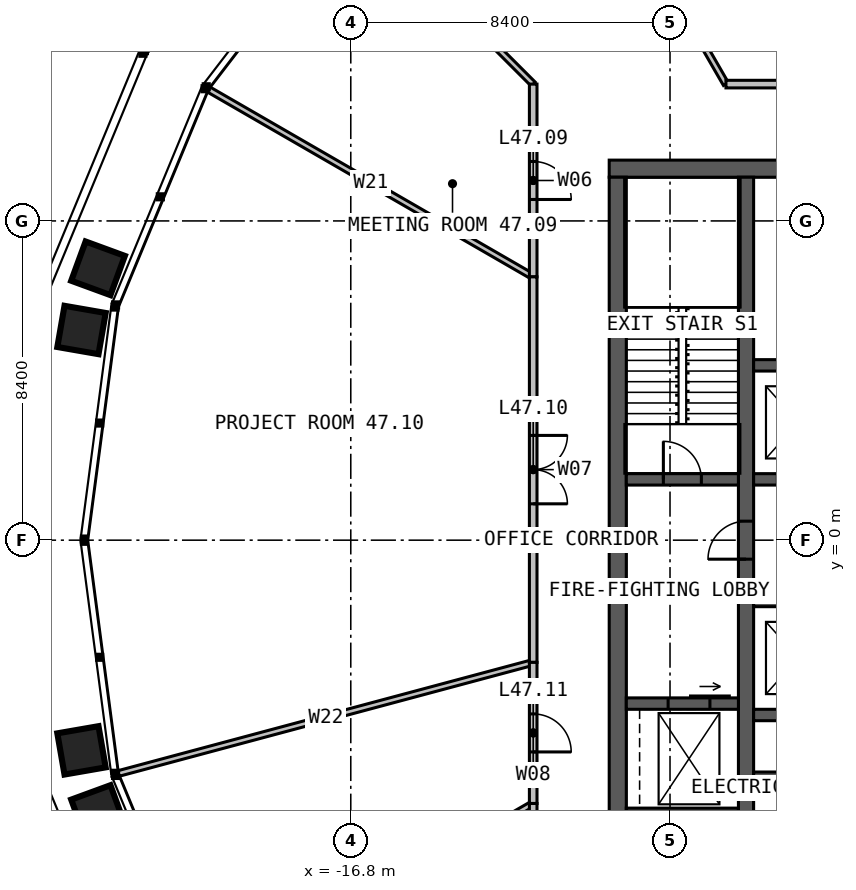
"""IFC4 building model, lengths in metres.
Left out: names, types, materials, properties, quantities, classifications, styles, units other than length and angle.
Written with IfcOpenShell. Run it as: python <this file> out.ifc"""

import sys

from ifc_helpers import new_model, si_unit, direction, frame, frame_2d, origin, place, context, subcontext, project, spatial, rectangle, extrude, element, fill, save


model = new_model("IFC4")
c1 = context("Model", 3, precision=1e-05, world=origin(), true_north=direction((0.0, 1.0)))
c2 = subcontext(c1, "Body", "Model", "MODEL_VIEW")
j1 = project(units=[si_unit("LENGTHUNIT", "METRE"), si_unit("PLANEANGLEUNIT", "RADIAN")], contexts=[c1])
p1 = place(None, origin())
s1 = spatial("IfcSite", under=j1, at=p1, CompositionType="ELEMENT")
p2 = place(p1, origin())
s2 = spatial("IfcBuilding", under=s1, at=p2, CompositionType="ELEMENT")
p3 = place(p2, frame((0.0, 0.0, 195.0)))
s3 = spatial("IfcBuildingStorey", under=s2, at=p3, CompositionType="ELEMENT", Elevation=195.0)
p4 = place(p3, frame((-10.0, 9.775, 0.0), z_axis=(0.0, 0.0, 1.0), x_axis=(1.0, 0.0, 0.0)))
e1 = element("IfcWall", 1, at=p4, inside=s3, PredefinedType="SOLIDWALL", context=c2, shape_type="SweptSolid", body=[
    extrude(rectangle(XDim=20.0, YDim=0.45, at=frame_2d((10.0, 0.0))), origin(), (0.0, 0.0, 1.0), 4.0),
])
p5 = place(p4, frame((9.4, 0.0, 0.0)))
e2 = element("IfcOpeningElement", 2, at=p5, cuts=e1, PredefinedType="OPENING", context=c2, shape_type="SweptSolid", body=[
    extrude(rectangle(XDim=1.2, YDim=2.2, at=frame_2d((0.6, 1.1))), frame((0.0, 0.235, 0.0), z_axis=(0.0, -1.0, 0.0), x_axis=(1.0, 0.0, 0.0)), (0.0, 0.0, 1.0), 0.47),
])
p6 = place(p3, frame((-9.775, 9.55, 0.0), z_axis=(0.0, 0.0, 1.0), x_axis=(0.0, -1.0, 0.0)))
e3 = element("IfcWall", 3, at=p6, inside=s3, PredefinedType="SOLIDWALL", context=c2, shape_type="SweptSolid", body=[
    extrude(rectangle(XDim=19.1, YDim=0.45, at=frame_2d((9.55, 0.0))), origin(), (0.0, 0.0, 1.0), 4.0),
])
p7 = place(p3, frame((-6.4, -9.55, 0.0), z_axis=(0.0, 0.0, 1.0), x_axis=(0.0, 1.0, 0.0)))
e4 = element("IfcWall", 4, at=p7, inside=s3, PredefinedType="SOLIDWALL", context=c2, shape_type="SweptSolid", body=[
    extrude(rectangle(XDim=19.1, YDim=0.4, at=frame_2d((9.55, 0.0))), origin(), (0.0, 0.0, 1.0), 4.0),
])
p8 = place(p7, frame((9.05, 0.0, 0.0)))
e5 = element("IfcOpeningElement", 5, at=p8, cuts=e4, PredefinedType="OPENING", context=c2, shape_type="SweptSolid", body=[
    extrude(rectangle(XDim=1.0, YDim=2.2, at=frame_2d((0.5, 1.1))), frame((0.0, 0.21, 0.0), z_axis=(0.0, -1.0, 0.0), x_axis=(1.0, 0.0, 0.0)), (0.0, 0.0, 1.0), 0.42),
])
p9 = place(p3, frame((-6.2, 1.6, 0.0), z_axis=(0.0, 0.0, 1.0), x_axis=(1.0, 0.0, 0.0)))
e6 = element("IfcWall", 6, at=p9, inside=s3, PredefinedType="SOLIDWALL", context=c2, shape_type="SweptSolid", body=[
    extrude(rectangle(XDim=4.85, YDim=0.3, at=frame_2d((2.425, 0.0))), origin(), (0.0, 0.0, 1.0), 4.0),
])
p10 = place(p9, frame((0.625, 0.0, 0.0)))
e7 = element("IfcOpeningElement", 7, at=p10, cuts=e6, PredefinedType="OPENING", context=c2, shape_type="SweptSolid", body=[
    extrude(rectangle(XDim=1.1, YDim=2.2, at=frame_2d((0.55, 1.1))), frame((0.0, 0.16, 0.0), z_axis=(0.0, -1.0, 0.0), x_axis=(1.0, 0.0, 0.0)), (0.0, 0.0, 1.0), 0.32),
])
p11 = place(p9, frame((3.15, 0.0, 0.0)))
e8 = element("IfcOpeningElement", 8, at=p11, cuts=e6, PredefinedType="OPENING", context=c2, shape_type="SweptSolid", body=[
    extrude(rectangle(XDim=1.1, YDim=2.2, at=frame_2d((0.55, 1.1))), frame((0.0, 0.16, 0.0), z_axis=(0.0, -1.0, 0.0), x_axis=(1.0, 0.0, 0.0)), (0.0, 0.0, 1.0), 0.32),
])
p12 = place(p3, frame((-6.2, 4.6, 0.0), z_axis=(0.0, 0.0, 1.0), x_axis=(1.0, 0.0, 0.0)))
e9 = element("IfcWall", 9, at=p12, inside=s3, PredefinedType="SOLIDWALL", context=c2, shape_type="SweptSolid", body=[
    extrude(rectangle(XDim=4.85, YDim=0.3, at=frame_2d((2.425, 0.0))), origin(), (0.0, 0.0, 1.0), 4.0),
])
for number, where, z_axis, x_axis in (
    (10, (-6.2, -1.6, 0.0), (0.0, 0.0, 1.0), (1.0, 0.0, 0.0)),
    (11, (-6.2, -4.6, 0.0), (0.0, 0.0, 1.0), (1.0, 0.0, 0.0)),
):
    element("IfcWall", number, at=place(p3, frame(where, z_axis=z_axis, x_axis=x_axis)), inside=s3, PredefinedType="SOLIDWALL", context=c2, shape_type="SweptSolid", body=[
        extrude(rectangle(XDim=7.4, YDim=0.3, at=frame_2d((3.7, 0.0))), origin(), (0.0, 0.0, 1.0), 4.0),
    ])
p13 = place(p3, frame((-6.2, -6.2, 0.0), z_axis=(0.0, 0.0, 1.0), x_axis=(1.0, 0.0, 0.0)))
e12 = element("IfcWall", 12, at=p13, inside=s3, PredefinedType="SOLIDWALL", context=c2, shape_type="SweptSolid", body=[
    extrude(rectangle(XDim=7.4, YDim=0.2, at=frame_2d((3.7, 0.0))), origin(), (0.0, 0.0, 1.0), 4.0),
])
p14 = place(p3, frame((-9.55, 1.6, 0.0), z_axis=(0.0, 0.0, 1.0), x_axis=(1.0, 0.0, 0.0)))
e13 = element("IfcWall", 13, at=p14, inside=s3, PredefinedType="SOLIDWALL", context=c2, shape_type="SweptSolid", body=[
    extrude(rectangle(XDim=2.95, YDim=0.3, at=frame_2d((1.475, 0.0))), origin(), (0.0, 0.0, 1.0), 4.0),
])
p15 = place(p14, frame((0.975, 0.0, 0.0)))
e14 = element("IfcOpeningElement", 14, at=p15, cuts=e13, PredefinedType="OPENING", context=c2, shape_type="SweptSolid", body=[
    extrude(rectangle(XDim=1.0, YDim=2.2, at=frame_2d((0.5, 1.1))), frame((0.0, 0.16, 0.0), z_axis=(0.0, -1.0, 0.0), x_axis=(1.0, 0.0, 0.0)), (0.0, 0.0, 1.0), 0.32),
])
p16 = place(p3, frame((-9.55, -4.3, 0.0), z_axis=(0.0, 0.0, 1.0), x_axis=(1.0, 0.0, 0.0)))
e15 = element("IfcWall", 15, at=p16, inside=s3, PredefinedType="SOLIDWALL", context=c2, shape_type="SweptSolid", body=[
    extrude(rectangle(XDim=2.95, YDim=0.3, at=frame_2d((1.475, 0.0))), origin(), (0.0, 0.0, 1.0), 4.0),
])
p17 = place(p16, frame((1.1, 0.0, 0.0)))
e16 = element("IfcOpeningElement", 16, at=p17, cuts=e15, PredefinedType="OPENING", context=c2, shape_type="SweptSolid", body=[
    extrude(rectangle(XDim=1.1, YDim=2.2, at=frame_2d((0.55, 1.1))), frame((0.0, 0.16, 0.0), z_axis=(0.0, -1.0, 0.0), x_axis=(1.0, 0.0, 0.0)), (0.0, 0.0, 1.0), 0.32),
])
p18 = place(p3, frame((-9.55, -7.2, 0.0), z_axis=(0.0, 0.0, 1.0), x_axis=(1.0, 0.0, 0.0)))
e17 = element("IfcWall", 17, at=p18, inside=s3, PredefinedType="SOLIDWALL", context=c2, shape_type="SweptSolid", body=[
    extrude(rectangle(XDim=2.95, YDim=0.3, at=frame_2d((1.475, 0.0))), origin(), (0.0, 0.0, 1.0), 4.0),
])
p19 = place(p3, frame((-6.928, 12.0, 0.0), z_axis=(0.0, 0.0, 1.0), x_axis=(-0.49999595416, 0.866027739639, 0.0)))
e18 = element("IfcWall", 18, at=p19, inside=s3, PredefinedType="PARTITIONING", context=c2, shape_type="SweptSolid", body=[
    extrude(rectangle(XDim=9.865, YDim=0.15, at=frame_2d((4.932, 0.0))), origin(), (0.0, 0.0, 1.0), 2.79),
])
p20 = place(p3, frame((-12.0, 12.0, 0.0), z_axis=(0.0, 0.0, 1.0), x_axis=(-0.707106781187, 0.707106781187, 0.0)))
e19 = element("IfcWall", 19, at=p20, inside=s3, PredefinedType="PARTITIONING", context=c2, shape_type="SweptSolid", body=[
    extrude(rectangle(XDim=6.751, YDim=0.15, at=frame_2d((3.375, 0.0))), origin(), (0.0, 0.0, 1.0), 2.79),
])
p21 = place(p3, frame((-12.0, 6.928, 0.0), z_axis=(0.0, 0.0, 1.0), x_axis=(-0.866027739639, 0.49999595416, 0.0)))
e20 = element("IfcWall", 20, at=p21, inside=s3, PredefinedType="PARTITIONING", context=c2, shape_type="SweptSolid", body=[
    extrude(rectangle(XDim=9.865, YDim=0.15, at=frame_2d((4.932, 0.0))), origin(), (0.0, 0.0, 1.0), 2.79),
])
p22 = place(p3, frame((-12.0, -3.215, 0.0), z_axis=(0.0, 0.0, 1.0), x_axis=(-0.965926155577, -0.258817816178, 0.0)))
e21 = element("IfcWall", 21, at=p22, inside=s3, PredefinedType="PARTITIONING", context=c2, shape_type="SweptSolid", body=[
    extrude(rectangle(XDim=11.298, YDim=0.15, at=frame_2d((5.649, 0.0))), origin(), (0.0, 0.0, 1.0), 2.79),
])
p23 = place(p3, frame((-12.0, -6.928, 0.0), z_axis=(0.0, 0.0, 1.0), x_axis=(-0.866027739639, -0.49999595416, 0.0)))
e22 = element("IfcWall", 22, at=p23, inside=s3, PredefinedType="PARTITIONING", context=c2, shape_type="SweptSolid", body=[
    extrude(rectangle(XDim=9.865, YDim=0.15, at=frame_2d((4.932, 0.0))), origin(), (0.0, 0.0, 1.0), 2.79),
])
p24 = place(p3, frame((6.928, 12.0, 0.0), z_axis=(0.0, 0.0, 1.0), x_axis=(-1.0, 0.0, 0.0)))
e23 = element("IfcWall", 23, at=p24, inside=s3, PredefinedType="PARTITIONING", context=c2, shape_type="SweptSolid", body=[
    extrude(rectangle(XDim=13.856, YDim=0.2, at=frame_2d((6.928, 0.0))), origin(), (0.0, 0.0, 1.0), 3.8),
])
p25 = place(p24, frame((6.028, 0.0, 0.0)))
e24 = element("IfcOpeningElement", 24, at=p25, cuts=e23, PredefinedType="OPENING", context=c2, shape_type="SweptSolid", body=[
    extrude(rectangle(XDim=1.8, YDim=2.2, at=frame_2d((0.9, 1.1))), frame((0.0, 0.11, 0.0), z_axis=(0.0, -1.0, 0.0), x_axis=(1.0, 0.0, 0.0)), (0.0, 0.0, 1.0), 0.22),
])
p26 = place(p3, frame((-12.0, 12.0, 0.0), z_axis=(0.0, 0.0, 1.0), x_axis=(0.0, -1.0, 0.0)))
e25 = element("IfcWall", 25, at=p26, inside=s3, PredefinedType="PARTITIONING", context=c2, shape_type="SweptSolid", body=[
    extrude(rectangle(XDim=5.072, YDim=0.2, at=frame_2d((2.536, 0.0))), origin(), (0.0, 0.0, 1.0), 3.8),
])
p27 = place(p26, frame((2.036, 0.0, 0.0)))
e26 = element("IfcOpeningElement", 26, at=p27, cuts=e25, PredefinedType="OPENING", context=c2, shape_type="SweptSolid", body=[
    extrude(rectangle(XDim=1.0, YDim=2.2, at=frame_2d((0.5, 1.1))), frame((0.0, 0.11, 0.0), z_axis=(0.0, -1.0, 0.0), x_axis=(1.0, 0.0, 0.0)), (0.0, 0.0, 1.0), 0.22),
])
p28 = place(p3, frame((-12.0, 6.928, 0.0), z_axis=(0.0, 0.0, 1.0), x_axis=(0.0, -1.0, 0.0)))
e27 = element("IfcWall", 27, at=p28, inside=s3, PredefinedType="PARTITIONING", context=c2, shape_type="SweptSolid", body=[
    extrude(rectangle(XDim=10.144, YDim=0.2, at=frame_2d((5.072, 0.0))), origin(), (0.0, 0.0, 1.0), 3.8),
])
p29 = place(p28, frame((4.172, 0.0, 0.0)))
e28 = element("IfcOpeningElement", 28, at=p29, cuts=e27, PredefinedType="OPENING", context=c2, shape_type="SweptSolid", body=[
    extrude(rectangle(XDim=1.8, YDim=2.2, at=frame_2d((0.9, 1.1))), frame((0.0, 0.11, 0.0), z_axis=(0.0, -1.0, 0.0), x_axis=(1.0, 0.0, 0.0)), (0.0, 0.0, 1.0), 0.22),
])
p30 = place(p3, frame((-12.0, -3.215, 0.0), z_axis=(0.0, 0.0, 1.0), x_axis=(0.0, -1.0, 0.0)))
e29 = element("IfcWall", 29, at=p30, inside=s3, PredefinedType="PARTITIONING", context=c2, shape_type="SweptSolid", body=[
    extrude(rectangle(XDim=3.713, YDim=0.2, at=frame_2d((1.856, 0.0))), origin(), (0.0, 0.0, 1.0), 3.8),
])
p31 = place(p30, frame((1.356, 0.0, 0.0)))
e30 = element("IfcOpeningElement", 30, at=p31, cuts=e29, PredefinedType="OPENING", context=c2, shape_type="SweptSolid", body=[
    extrude(rectangle(XDim=1.0, YDim=2.2, at=frame_2d((0.5, 1.1))), frame((0.0, 0.11, 0.0), z_axis=(0.0, -1.0, 0.0), x_axis=(1.0, 0.0, 0.0)), (0.0, 0.0, 1.0), 0.22),
])
p32 = place(p3, frame((-12.0, -6.928, 0.0), z_axis=(0.0, 0.0, 1.0), x_axis=(0.0, -1.0, 0.0)))
e31 = element("IfcWall", 31, at=p32, inside=s3, PredefinedType="PARTITIONING", context=c2, shape_type="SweptSolid", body=[
    extrude(rectangle(XDim=5.072, YDim=0.2, at=frame_2d((2.536, 0.0))), origin(), (0.0, 0.0, 1.0), 3.8),
])
p33 = place(p32, frame((1.636, 0.0, 0.0)))
e32 = element("IfcOpeningElement", 32, at=p33, cuts=e31, PredefinedType="OPENING", context=c2, shape_type="SweptSolid", body=[
    extrude(rectangle(XDim=1.8, YDim=2.2, at=frame_2d((0.9, 1.1))), frame((0.0, 0.11, 0.0), z_axis=(0.0, -1.0, 0.0), x_axis=(1.0, 0.0, 0.0)), (0.0, 0.0, 1.0), 0.22),
])
p34 = place(p8, origin())
e33 = element("IfcDoor", 33, at=p34, inside=s3, OperationType="SINGLE_SWING_LEFT", PredefinedType="DOOR", context=c2, shape_type="SweptSolid", body=[
    extrude(rectangle(XDim=1.0, YDim=2.2, at=frame_2d((0.5, 1.1))), frame((0.0, 0.025, 0.0), z_axis=(0.0, -1.0, 0.0), x_axis=(1.0, 0.0, 0.0)), (0.0, 0.0, 1.0), 0.05),
])
fill(e5, e33)
p35 = place(p15, origin())
e34 = element("IfcDoor", 34, at=p35, inside=s3, OperationType="SINGLE_SWING_LEFT", PredefinedType="DOOR", context=c2, shape_type="SweptSolid", body=[
    extrude(rectangle(XDim=1.0, YDim=2.2, at=frame_2d((0.5, 1.1))), frame((0.0, 0.025, 0.0), z_axis=(0.0, -1.0, 0.0), x_axis=(1.0, 0.0, 0.0)), (0.0, 0.0, 1.0), 0.05),
])
fill(e14, e34)
p36 = place(p17, origin())
e35 = element("IfcDoor", 35, at=p36, inside=s3, OperationType="SLIDING_TO_LEFT", PredefinedType="DOOR", context=c2, shape_type="SweptSolid", body=[
    extrude(rectangle(XDim=1.1, YDim=2.2, at=frame_2d((0.55, 1.1))), frame((0.0, 0.025, 0.0), z_axis=(0.0, -1.0, 0.0), x_axis=(1.0, 0.0, 0.0)), (0.0, 0.0, 1.0), 0.05),
])
fill(e16, e35)
p37 = place(p27, origin())
e36 = element("IfcDoor", 36, at=p37, inside=s3, OperationType="SINGLE_SWING_RIGHT", PredefinedType="DOOR", context=c2, shape_type="SweptSolid", body=[
    extrude(rectangle(XDim=1.0, YDim=2.2, at=frame_2d((0.5, 1.1))), frame((0.0, 0.025, 0.0), z_axis=(0.0, -1.0, 0.0), x_axis=(1.0, 0.0, 0.0)), (0.0, 0.0, 1.0), 0.05),
])
fill(e26, e36)
p38 = place(p29, origin())
e37 = element("IfcDoor", 37, at=p38, inside=s3, OperationType="DOUBLE_DOOR_SINGLE_SWING", PredefinedType="DOOR", context=c2, shape_type="SweptSolid", body=[
    extrude(rectangle(XDim=1.8, YDim=2.2, at=frame_2d((0.9, 1.1))), frame((0.0, 0.025, 0.0), z_axis=(0.0, -1.0, 0.0), x_axis=(1.0, 0.0, 0.0)), (0.0, 0.0, 1.0), 0.05),
])
fill(e28, e37)
p39 = place(p31, origin())
e38 = element("IfcDoor", 38, at=p39, inside=s3, OperationType="SINGLE_SWING_RIGHT", PredefinedType="DOOR", context=c2, shape_type="SweptSolid", body=[
    extrude(rectangle(XDim=1.0, YDim=2.2, at=frame_2d((0.5, 1.1))), frame((0.0, 0.025, 0.0), z_axis=(0.0, -1.0, 0.0), x_axis=(1.0, 0.0, 0.0)), (0.0, 0.0, 1.0), 0.05),
])
fill(e30, e38)
save(model, sys.argv[1])
